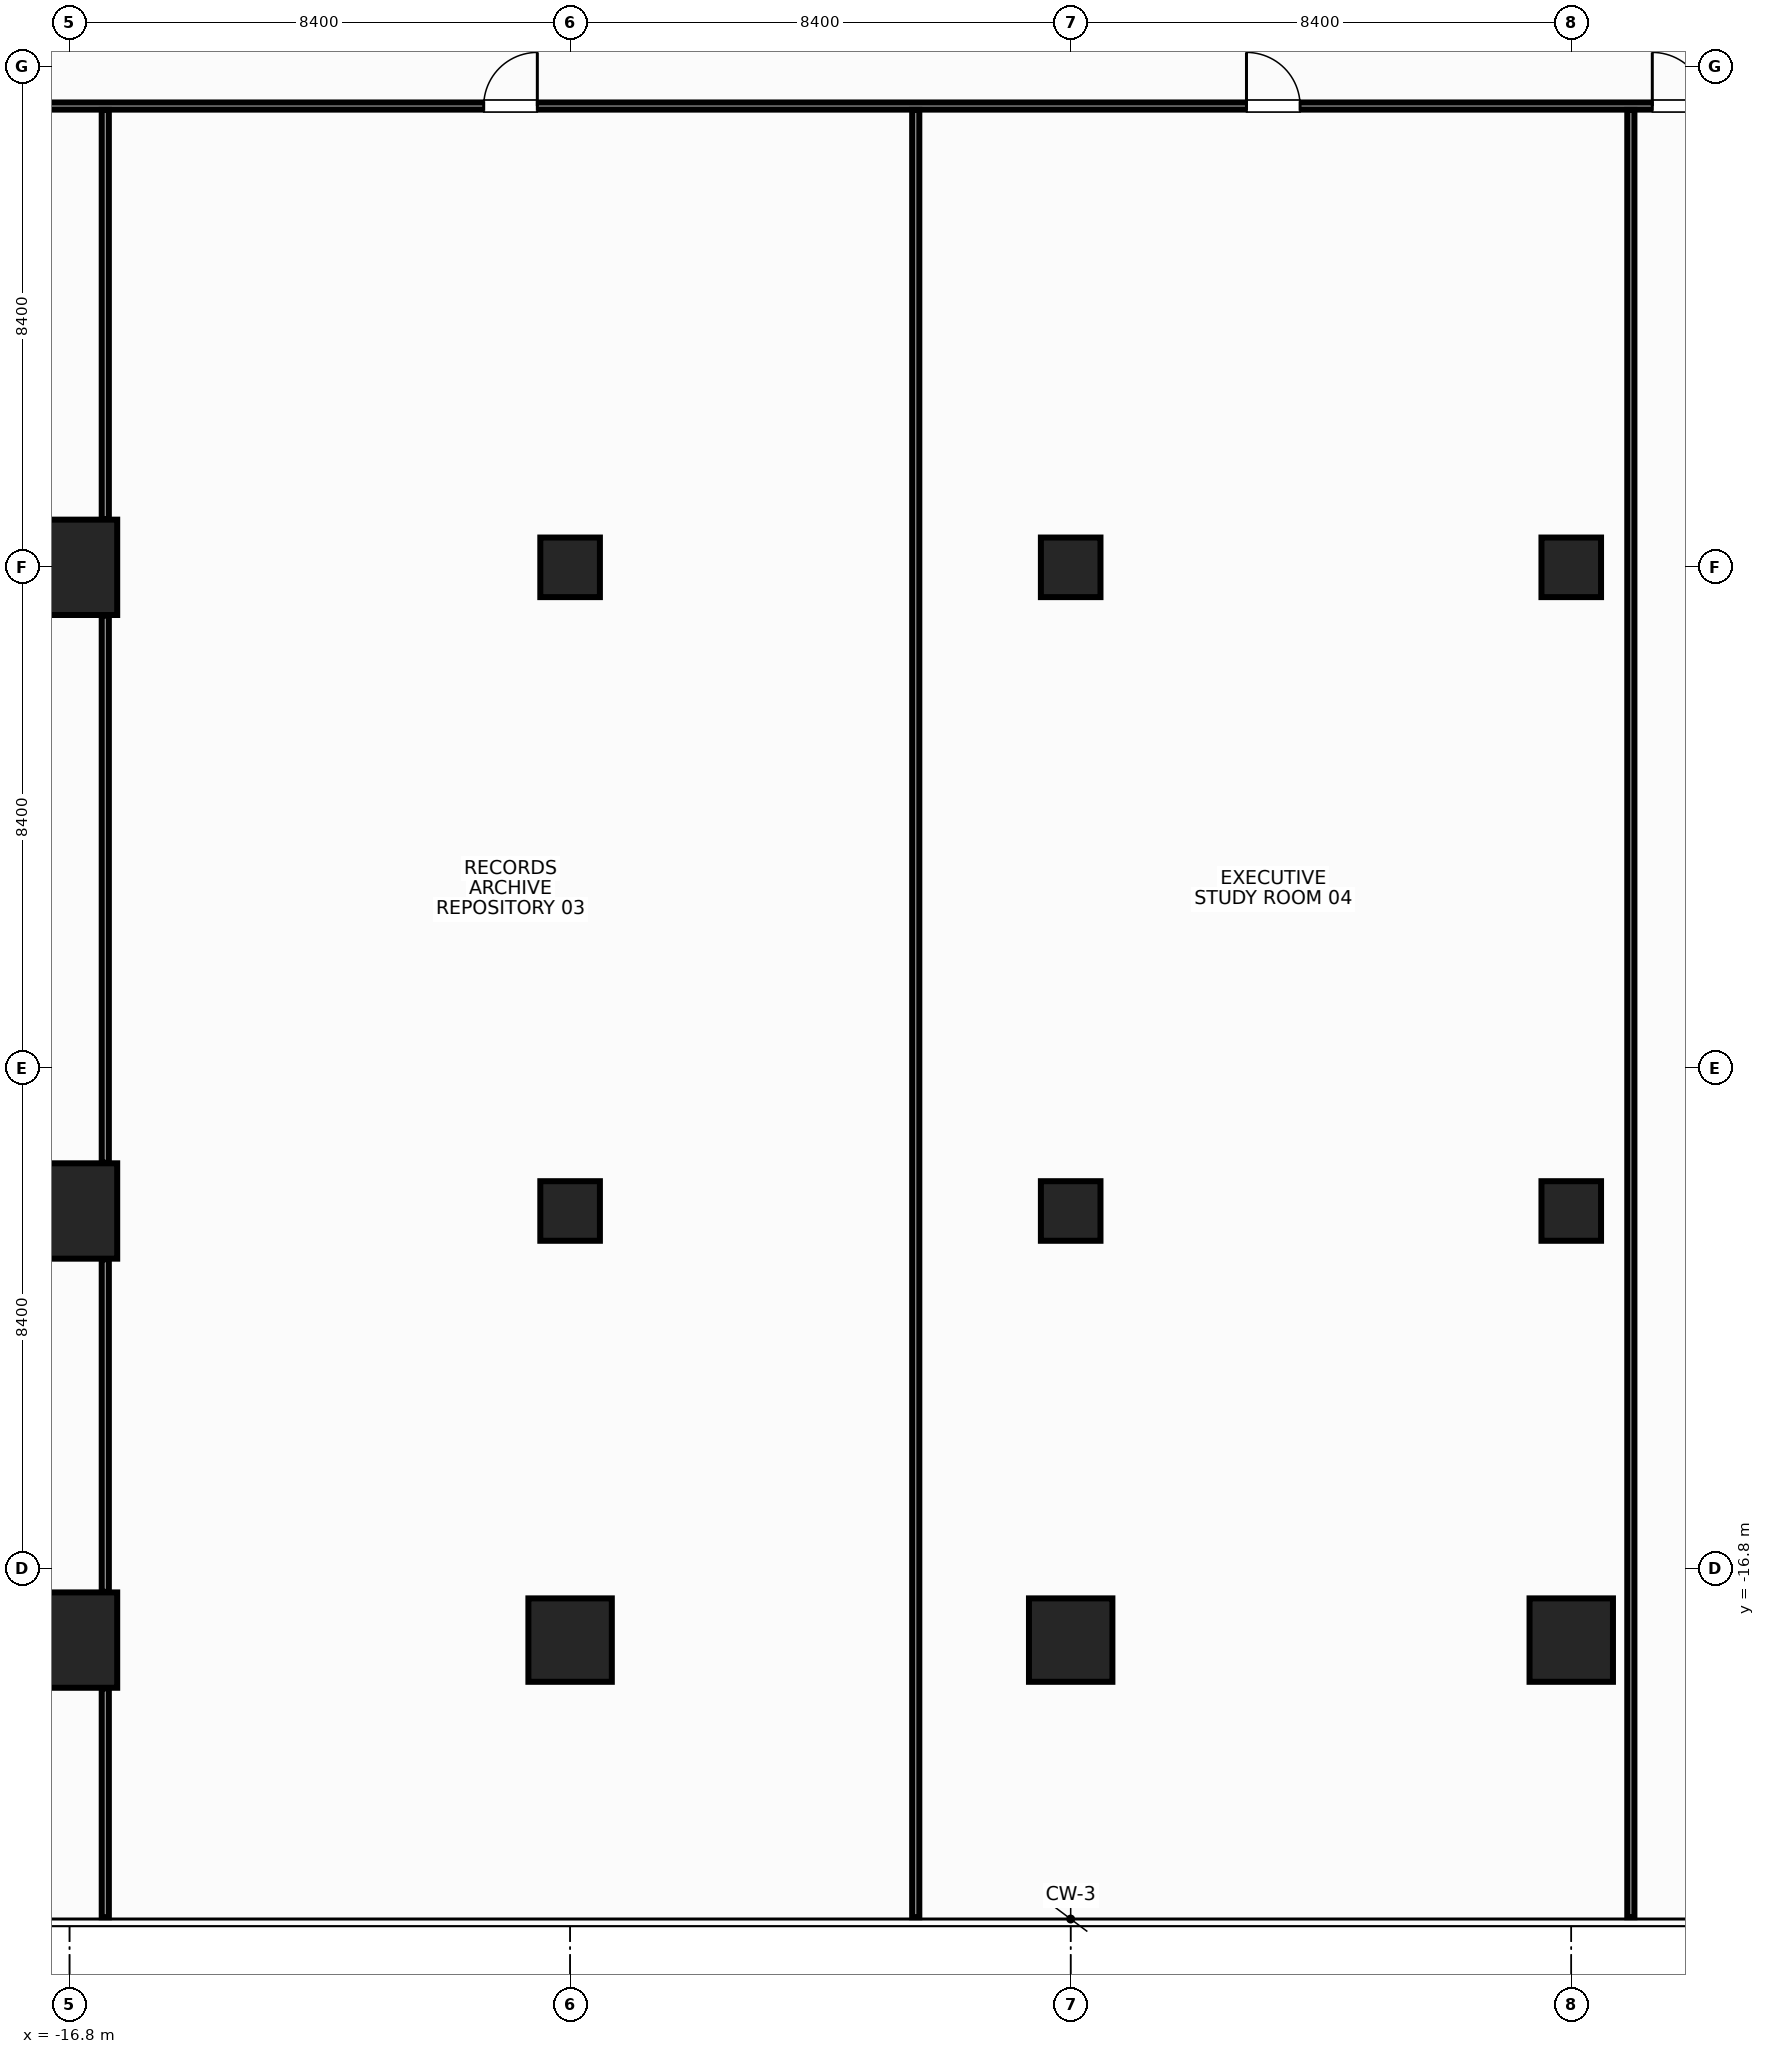
"""IFC4 building model, lengths in metres.
Left out: names, types, materials, properties, quantities, classifications, styles, units other than length and angle.
Written with IfcOpenShell. Run it as: python <this file> out.ifc"""

import sys

from ifc_helpers import new_model, si_unit, direction, frame, frame_2d, origin, origin_2d, place, context, subcontext, project, spatial, rectangle, hollow_rectangle, extrude, source, transform, mapped, element, fill, save


model = new_model("IFC4")
c1 = context("Model", 3, precision=1e-05, world=origin(), true_north=direction((0.0, 1.0)))
c2 = subcontext(c1, "Body", "Model", "MODEL_VIEW")
j1 = project(units=[si_unit("LENGTHUNIT", "METRE"), si_unit("PLANEANGLEUNIT", "RADIAN")], contexts=[c1])
p1 = place(None, origin())
s1 = spatial("IfcSite", under=j1, at=p1, CompositionType="ELEMENT")
p2 = place(p1, origin())
s2 = spatial("IfcBuilding", under=s1, at=p2, CompositionType="ELEMENT")
p3 = place(p2, frame((0.0, 0.0, 142.4)))
s3 = spatial("IfcBuildingStorey", under=s2, at=p3, CompositionType="ELEMENT", Elevation=142.4)
m1 = source(origin(), c2, "Body", "SweptSolid", [
    extrude(rectangle(XDim=1.6, YDim=1.6, at=origin_2d()), origin(), (0.0, 0.0, 1.0), 3.6),
])
for number, where, z_axis, x_axis in (
    (1, (-16.8, -18.0, 0.0), (0.0, 0.0, 1.0), (1.0, 0.0, 0.0)),
    (2, (-16.8, -10.8, 0.0), (0.0, 0.0, 1.0), (1.0, 0.0, 0.0)),
    (3, (-16.8, 0.0, 0.0), (0.0, 0.0, 1.0), (1.0, 0.0, 0.0)),
):
    element("IfcColumn", number, at=place(p3, frame(where, z_axis=z_axis, x_axis=x_axis)), inside=s3, PredefinedType="COLUMN", context=c2, shape_type="MappedRepresentation", body=[
        mapped(m1, transform((0.0, 0.0, 0.0), x_axis=(1.0, 0.0, 0.0), y_axis=(0.0, 1.0, 0.0), z_axis=(0.0, 0.0, 1.0), scale=1.0)),
    ])
m2 = source(origin(), c2, "Body", "SweptSolid", [
    extrude(rectangle(XDim=1.4, YDim=1.4, at=origin_2d()), origin(), (0.0, 0.0, 1.0), 3.6),
])
p4 = place(p3, frame((-8.4, -18.0, 0.0), z_axis=(0.0, 0.0, 1.0), x_axis=(1.0, 0.0, 0.0)))
e4 = element("IfcColumn", 4, at=p4, inside=s3, PredefinedType="COLUMN", context=c2, shape_type="MappedRepresentation", body=[
    mapped(m2, transform((0.0, 0.0, 0.0), x_axis=(1.0, 0.0, 0.0), y_axis=(0.0, 1.0, 0.0), z_axis=(0.0, 0.0, 1.0), scale=1.0)),
])
m3 = source(origin(), c2, "Body", "SweptSolid", [
    extrude(hollow_rectangle(XDim=1.0, YDim=1.0, WallThickness=0.045, at=origin_2d()), origin(), (0.0, 0.0, 1.0), 3.6),
])
for number, where, z_axis, x_axis in (
    (5, (-8.4, 0.0, 0.0), (0.0, 0.0, 1.0), (1.0, 0.0, 0.0)),
    (6, (-8.4, -10.8, 0.0), (0.0, 0.0, 1.0), (1.0, 0.0, 0.0)),
):
    element("IfcColumn", number, at=place(p3, frame(where, z_axis=z_axis, x_axis=x_axis)), inside=s3, PredefinedType="COLUMN", context=c2, shape_type="MappedRepresentation", body=[
        mapped(m3, transform((0.0, 0.0, 0.0), x_axis=(1.0, 0.0, 0.0), y_axis=(0.0, 1.0, 0.0), z_axis=(0.0, 0.0, 1.0), scale=1.0)),
    ])
p5 = place(p3, frame((8.4, -18.0, 0.0), z_axis=(0.0, 0.0, 1.0), x_axis=(1.0, 0.0, 0.0)))
e7 = element("IfcColumn", 7, at=p5, inside=s3, PredefinedType="COLUMN", context=c2, shape_type="MappedRepresentation", body=[
    mapped(m2, transform((0.0, 0.0, 0.0), x_axis=(1.0, 0.0, 0.0), y_axis=(0.0, 1.0, 0.0), z_axis=(0.0, 0.0, 1.0), scale=1.0)),
])
for number, where, z_axis, x_axis in (
    (8, (8.4, 0.0, 0.0), (0.0, 0.0, 1.0), (1.0, 0.0, 0.0)),
    (9, (8.4, -10.8, 0.0), (0.0, 0.0, 1.0), (1.0, 0.0, 0.0)),
):
    element("IfcColumn", number, at=place(p3, frame(where, z_axis=z_axis, x_axis=x_axis)), inside=s3, PredefinedType="COLUMN", context=c2, shape_type="MappedRepresentation", body=[
        mapped(m3, transform((0.0, 0.0, 0.0), x_axis=(1.0, 0.0, 0.0), y_axis=(0.0, 1.0, 0.0), z_axis=(0.0, 0.0, 1.0), scale=1.0)),
    ])
p6 = place(p3, frame((0.0, -18.0, 0.0), z_axis=(0.0, 0.0, 1.0), x_axis=(1.0, 0.0, 0.0)))
e10 = element("IfcColumn", 10, at=p6, inside=s3, PredefinedType="COLUMN", context=c2, shape_type="MappedRepresentation", body=[
    mapped(m2, transform((0.0, 0.0, 0.0), x_axis=(1.0, 0.0, 0.0), y_axis=(0.0, 1.0, 0.0), z_axis=(0.0, 0.0, 1.0), scale=1.0)),
])
m4 = source(origin(), c2, "Body", "SweptSolid", [
    extrude(rectangle(XDim=1.0, YDim=1.0, at=origin_2d()), origin(), (0.0, 0.0, 1.0), 3.6),
])
for number, where, z_axis, x_axis in (
    (11, (0.0, -10.8, 0.0), (0.0, 0.0, 1.0), (1.0, 0.0, 0.0)),
    (12, (0.0, 0.0, 0.0), (0.0, 0.0, 1.0), (1.0, 0.0, 0.0)),
):
    element("IfcColumn", number, at=place(p3, frame(where, z_axis=z_axis, x_axis=x_axis)), inside=s3, PredefinedType="COLUMN", context=c2, shape_type="MappedRepresentation", body=[
        mapped(m4, transform((0.0, 0.0, 0.0), x_axis=(1.0, 0.0, 0.0), y_axis=(0.0, 1.0, 0.0), z_axis=(0.0, 0.0, 1.0), scale=1.0)),
    ])
m5 = source(origin(), c2, "Body", "SweptSolid", [
    extrude(rectangle(XDim=31.6, YDim=0.12, at=frame_2d((15.8, 0.0))), origin(), (0.0, 0.0, 1.0), 2.765),
])
p7 = place(p3, frame((-20.52, 7.74, 0.0), z_axis=(0.0, 0.0, 1.0), x_axis=(1.0, 0.0, 0.0)))
e13 = element("IfcWall", 13, at=p7, inside=s3, PredefinedType="PARTITIONING", context=c2, shape_type="MappedRepresentation", body=[
    mapped(m5, transform((0.0, 0.0, 0.0), x_axis=(1.0, 0.0, 0.0), y_axis=(0.0, 1.0, 0.0), z_axis=(0.0, 0.0, 1.0), scale=1.0)),
])
p8 = place(p7, frame((1.74, 0.0, 0.0)))
e14 = element("IfcOpeningElement", 14, at=p8, cuts=e13, PredefinedType="OPENING", context=c2, shape_type="SweptSolid", body=[
    extrude(rectangle(XDim=0.9, YDim=2.15, at=frame_2d((0.45, 1.075))), frame((0.0, 0.072, 0.0), z_axis=(0.0, -1.0, 0.0), x_axis=(1.0, 0.0, 0.0)), (0.0, 0.0, 1.0), 0.144),
])
p9 = place(p7, frame((30.28, 0.0, 0.0)))
e15 = element("IfcOpeningElement", 15, at=p9, cuts=e13, PredefinedType="OPENING", context=c2, shape_type="SweptSolid", body=[
    extrude(rectangle(XDim=0.9, YDim=2.15, at=frame_2d((0.45, 1.075))), frame((0.0, 0.072, 0.0), z_axis=(0.0, -1.0, 0.0), x_axis=(1.0, 0.0, 0.0)), (0.0, 0.0, 1.0), 0.144),
])
p10 = place(p7, frame((10.67, 0.0, 0.0)))
e16 = element("IfcOpeningElement", 16, at=p10, cuts=e13, PredefinedType="OPENING", context=c2, shape_type="SweptSolid", body=[
    extrude(rectangle(XDim=0.9, YDim=2.15, at=frame_2d((0.45, 1.075))), frame((0.0, 0.072, 0.0), z_axis=(0.0, -1.0, 0.0), x_axis=(1.0, 0.0, 0.0)), (0.0, 0.0, 1.0), 0.144),
])
p11 = place(p7, frame((23.47, 0.0, 0.0)))
e17 = element("IfcOpeningElement", 17, at=p11, cuts=e13, PredefinedType="OPENING", context=c2, shape_type="SweptSolid", body=[
    extrude(rectangle(XDim=0.9, YDim=2.15, at=frame_2d((0.45, 1.075))), frame((0.0, 0.072, 0.0), z_axis=(0.0, -1.0, 0.0), x_axis=(1.0, 0.0, 0.0)), (0.0, 0.0, 1.0), 0.144),
])
m6 = source(origin(), c2, "Body", "SweptSolid", [
    extrude(rectangle(XDim=3.84, YDim=0.12, at=frame_2d((1.92, 0.0))), origin(), (0.0, 0.0, 1.0), 3.38),
])
p12 = place(p3, frame((-16.2, -22.65, 0.0), z_axis=(0.0, 0.0, 1.0), x_axis=(0.0, 1.0, 0.0)))
e18 = element("IfcWall", 18, at=p12, inside=s3, PredefinedType="PARTITIONING", context=c2, shape_type="MappedRepresentation", body=[
    mapped(m6, transform((0.0, 0.0, 0.0), x_axis=(1.0, 0.0, 0.0), y_axis=(0.0, 1.0, 0.0), z_axis=(0.0, 0.0, 1.0), scale=1.0)),
])
m7 = source(origin(), c2, "Body", "SweptSolid", [
    extrude(rectangle(XDim=5.58, YDim=0.12, at=frame_2d((2.79, 0.0))), origin(), (0.0, 0.0, 1.0), 3.38),
])
p13 = place(p3, frame((-16.2, -17.19, 0.0), z_axis=(0.0, 0.0, 1.0), x_axis=(0.0, 1.0, 0.0)))
e19 = element("IfcWall", 19, at=p13, inside=s3, PredefinedType="PARTITIONING", context=c2, shape_type="MappedRepresentation", body=[
    mapped(m7, transform((0.0, 0.0, 0.0), x_axis=(1.0, 0.0, 0.0), y_axis=(0.0, 1.0, 0.0), z_axis=(0.0, 0.0, 1.0), scale=1.0)),
])
m8 = source(origin(), c2, "Body", "SweptSolid", [
    extrude(rectangle(XDim=9.18, YDim=0.12, at=frame_2d((4.59, 0.0))), origin(), (0.0, 0.0, 1.0), 3.38),
])
p14 = place(p3, frame((-16.2, -9.99, 0.0), z_axis=(0.0, 0.0, 1.0), x_axis=(0.0, 1.0, 0.0)))
e20 = element("IfcWall", 20, at=p14, inside=s3, PredefinedType="PARTITIONING", context=c2, shape_type="MappedRepresentation", body=[
    mapped(m8, transform((0.0, 0.0, 0.0), x_axis=(1.0, 0.0, 0.0), y_axis=(0.0, 1.0, 0.0), z_axis=(0.0, 0.0, 1.0), scale=1.0)),
])
m9 = source(origin(), c2, "Body", "SweptSolid", [
    extrude(rectangle(XDim=6.865, YDim=0.12, at=frame_2d((3.433, 0.0))), origin(), (0.0, 0.0, 1.0), 2.665),
])
p15 = place(p3, frame((-16.2, 0.81, 0.0), z_axis=(0.0, 0.0, 1.0), x_axis=(0.0, 1.0, 0.0)))
e21 = element("IfcWall", 21, at=p15, inside=s3, PredefinedType="PARTITIONING", context=c2, shape_type="MappedRepresentation", body=[
    mapped(m9, transform((0.0, 0.0, 0.0), x_axis=(1.0, 0.0, 0.0), y_axis=(0.0, 1.0, 0.0), z_axis=(0.0, 0.0, 1.0), scale=1.0)),
])
m10 = source(origin(), c2, "Body", "SweptSolid", [
    extrude(rectangle(XDim=30.325, YDim=0.12, at=frame_2d((15.163, 0.0))), origin(), (0.0, 0.0, 1.0), 2.665),
])
for number, where, z_axis, x_axis in (
    (22, (-2.6, -22.65, 0.0), (0.0, 0.0, 1.0), (0.0, 1.0, 0.0)),
    (23, (9.4, -22.65, 0.0), (0.0, 0.0, 1.0), (0.0, 1.0, 0.0)),
):
    element("IfcWall", number, at=place(p3, frame(where, z_axis=z_axis, x_axis=x_axis)), inside=s3, PredefinedType="PARTITIONING", context=c2, shape_type="MappedRepresentation", body=[
        mapped(m10, transform((0.0, 0.0, 0.0), x_axis=(1.0, 0.0, 0.0), y_axis=(0.0, 1.0, 0.0), z_axis=(0.0, 0.0, 1.0), scale=1.0)),
    ])
m11 = source(origin(), c2, "Body", "SweptSolid", [
    extrude(rectangle(XDim=0.9, YDim=2.15, at=frame_2d((0.45, 1.075))), frame((0.0, 0.025, 0.0), z_axis=(0.0, -1.0, 0.0), x_axis=(1.0, 0.0, 0.0)), (0.0, 0.0, 1.0), 0.05),
])
p16 = place(p9, origin())
e24 = element("IfcDoor", 24, at=p16, inside=s3, OperationType="SINGLE_SWING_LEFT", PredefinedType="DOOR", context=c2, shape_type="MappedRepresentation", body=[
    mapped(m11, transform((0.0, 0.0, 0.0), x_axis=(1.0, 0.0, 0.0), y_axis=(0.0, 1.0, 0.0), z_axis=(0.0, 0.0, 1.0), scale=1.0)),
])
fill(e15, e24)
p17 = place(p10, origin())
e25 = element("IfcDoor", 25, at=p17, inside=s3, OperationType="SINGLE_SWING_RIGHT", PredefinedType="DOOR", context=c2, shape_type="MappedRepresentation", body=[
    mapped(m11, transform((0.0, 0.0, 0.0), x_axis=(1.0, 0.0, 0.0), y_axis=(0.0, 1.0, 0.0), z_axis=(0.0, 0.0, 1.0), scale=1.0)),
])
fill(e16, e25)
p18 = place(p11, origin())
e26 = element("IfcDoor", 26, at=p18, inside=s3, OperationType="SINGLE_SWING_LEFT", PredefinedType="DOOR", context=c2, shape_type="MappedRepresentation", body=[
    mapped(m11, transform((0.0, 0.0, 0.0), x_axis=(1.0, 0.0, 0.0), y_axis=(0.0, 1.0, 0.0), z_axis=(0.0, 0.0, 1.0), scale=1.0)),
])
fill(e17, e26)
save(model, sys.argv[1])
